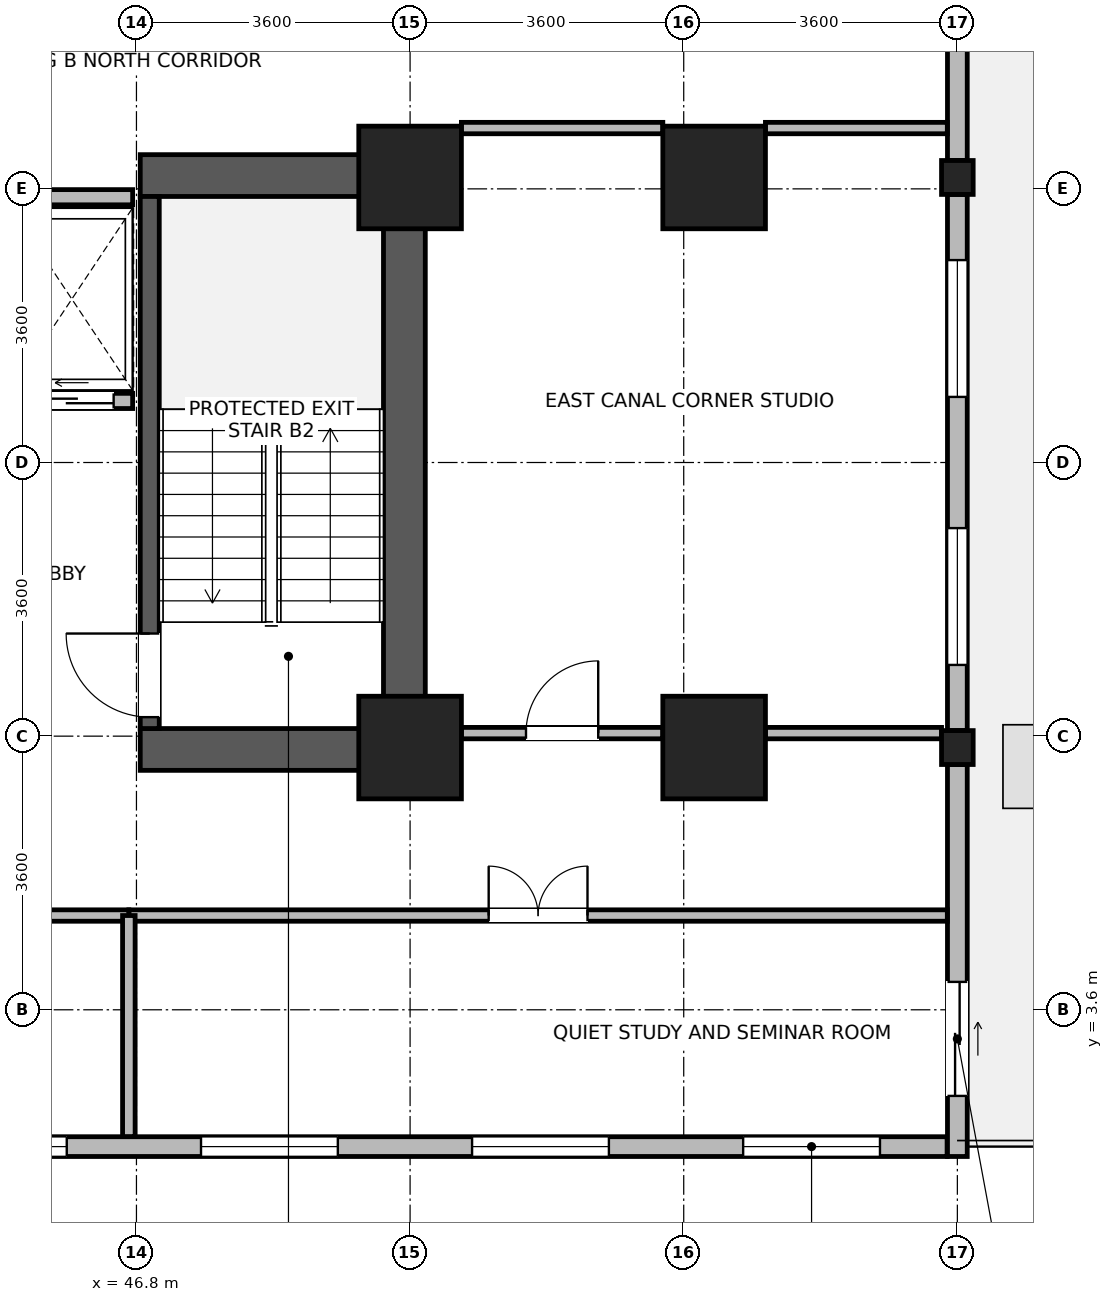
"""IFC4 building model, lengths in metres.
Left out: names, types, materials, properties, quantities, classifications, styles, units other than length and angle.
Written with IfcOpenShell. Run it as: python <this file> out.ifc"""

import sys

from ifc_helpers import new_model, si_unit, direction, frame, frame_2d, origin, origin_2d, place, context, subcontext, project, spatial, rectangle, i_section, extrude, source, transform, mapped, element, fill, save


model = new_model("IFC4")
c1 = context("Model", 3, precision=1e-05, world=origin(), true_north=direction((0.0, 1.0)))
c2 = subcontext(c1, "Body", "Model", "MODEL_VIEW")
j1 = project(units=[si_unit("LENGTHUNIT", "METRE"), si_unit("PLANEANGLEUNIT", "RADIAN")], contexts=[c1])
p1 = place(None, origin())
s1 = spatial("IfcSite", under=j1, at=p1, CompositionType="ELEMENT")
p2 = place(p1, origin())
s2 = spatial("IfcBuilding", under=s1, at=p2, CompositionType="ELEMENT")
p3 = place(p2, frame((0.0, 0.0, 40.1)))
s3 = spatial("IfcBuildingStorey", under=s2, at=p3, CompositionType="ELEMENT", Elevation=40.1)
p4 = place(p3, frame((50.325, 6.75, 0.0), z_axis=(0.0, 0.0, 1.0), x_axis=(0.0, 1.0, 0.0)))
e1 = element("IfcWall", 1, at=p4, inside=s3, PredefinedType="SHEAR", context=c2, shape_type="SweptSolid", body=[
    extrude(rectangle(XDim=8.1, YDim=0.55, at=frame_2d((4.05, 0.0))), origin(), (0.0, 0.0, 1.0), 3.45),
])
for number, where, z_axis, x_axis in (
    (2, (46.85, 7.025, 0.0), (0.0, 0.0, 1.0), (1.0, 0.0, 0.0)),
    (3, (46.85, 14.575, 0.0), (0.0, 0.0, 1.0), (1.0, 0.0, 0.0)),
):
    element("IfcWall", number, at=place(p3, frame(where, z_axis=z_axis, x_axis=x_axis)), inside=s3, PredefinedType="SHEAR", context=c2, shape_type="SweptSolid", body=[
        extrude(rectangle(XDim=3.2, YDim=0.55, at=frame_2d((1.6, 0.0))), origin(), (0.0, 0.0, 1.0), 3.45),
    ])
p5 = place(p3, frame((46.975, 7.3, 0.0), z_axis=(0.0, 0.0, 1.0), x_axis=(0.0, 1.0, 0.0)))
e4 = element("IfcWall", 4, at=p5, inside=s3, PredefinedType="SHEAR", context=c2, shape_type="SweptSolid", body=[
    extrude(rectangle(XDim=7.0, YDim=0.25, at=frame_2d((3.5, 0.0))), origin(), (0.0, 0.0, 1.0), 3.45),
])
p6 = place(p5, frame((0.15, 0.0, 0.0)))
e5 = element("IfcOpeningElement", 5, at=p6, cuts=e4, PredefinedType="OPENING", context=c2, shape_type="SweptSolid", body=[
    extrude(rectangle(XDim=1.1, YDim=2.08, at=frame_2d((0.55, 1.04))), frame((0.0, 0.135, 0.0), z_axis=(0.0, -1.0, 0.0), x_axis=(1.0, 0.0, 0.0)), (0.0, 0.0, 1.0), 0.27),
])
m1 = source(origin(), c2, "Body", "SweptSolid", [
    extrude(rectangle(XDim=1.35, YDim=1.35, at=origin_2d()), origin(), (0.0, 0.0, 1.0), 3.7),
])
for number, where, z_axis, x_axis in (
    (6, (50.4, 7.05, 0.0), (0.0, 0.0, 1.0), (1.0, 0.0, 0.0)),
    (7, (50.4, 14.55, 0.0), (0.0, 0.0, 1.0), (1.0, 0.0, 0.0)),
    (8, (54.4, 7.05, 0.0), (0.0, 0.0, 1.0), (1.0, 0.0, 0.0)),
    (9, (54.4, 14.55, 0.0), (0.0, 0.0, 1.0), (1.0, 0.0, 0.0)),
):
    element("IfcColumn", number, at=place(p3, frame(where, z_axis=z_axis, x_axis=x_axis)), inside=s3, PredefinedType="COLUMN", context=c2, shape_type="MappedRepresentation", body=[
        mapped(m1, transform((0.0, 0.0, 0.0), x_axis=(1.0, 0.0, 0.0), y_axis=(0.0, 1.0, 0.0), z_axis=(0.0, 0.0, 1.0), scale=1.0)),
    ])
m2 = source(origin(), c2, "Body", "SweptSolid", [
    extrude(i_section(OverallWidth=0.416, OverallDepth=0.446, WebThickness=0.029, FlangeThickness=0.04, FilletRadius=0.015, at=origin_2d()), origin(), (0.0, 0.0, 1.0), 3.7),
])
for number, where, z_axis, x_axis in (
    (10, (57.6, 7.05, 0.0), (0.0, 0.0, 1.0), (1.0, 0.0, 0.0)),
    (11, (57.6, 14.55, 0.0), (0.0, 0.0, 1.0), (1.0, 0.0, 0.0)),
):
    element("IfcColumn", number, at=place(p3, frame(where, z_axis=z_axis, x_axis=x_axis)), inside=s3, PredefinedType="COLUMN", context=c2, shape_type="MappedRepresentation", body=[
        mapped(m2, transform((0.0, 0.0, 0.0), x_axis=(1.0, 0.0, 0.0), y_axis=(0.0, 1.0, 0.0), z_axis=(0.0, 0.0, 1.0), scale=1.0)),
    ])
p7 = place(p3, frame((57.465, 1.8, 0.0), z_axis=(0.0, 0.0, 1.0), x_axis=(-1.0, 0.0, 0.0)))
e12 = element("IfcWall", 12, at=p7, inside=s3, PredefinedType="STANDARD", context=c2, shape_type="SweptSolid", body=[
    extrude(rectangle(XDim=28.53, YDim=0.26, at=frame_2d((14.265, 0.0))), origin(), (0.0, 0.0, 1.0), 3.43),
])
p8 = place(p7, frame((0.883, 0.0, 0.85)))
e13 = element("IfcOpeningElement", 13, at=p8, cuts=e12, PredefinedType="OPENING", context=c2, shape_type="SweptSolid", body=[
    extrude(rectangle(XDim=1.8, YDim=1.85, at=frame_2d((0.9, 0.925))), frame((0.0, 0.14, 0.0), z_axis=(0.0, -1.0, 0.0), x_axis=(1.0, 0.0, 0.0)), (0.0, 0.0, 1.0), 0.28),
])
p9 = place(p7, frame((4.449, 0.0, 0.85)))
e14 = element("IfcOpeningElement", 14, at=p9, cuts=e12, PredefinedType="OPENING", context=c2, shape_type="SweptSolid", body=[
    extrude(rectangle(XDim=1.8, YDim=1.85, at=frame_2d((0.9, 0.925))), frame((0.0, 0.14, 0.0), z_axis=(0.0, -1.0, 0.0), x_axis=(1.0, 0.0, 0.0)), (0.0, 0.0, 1.0), 0.28),
])
p10 = place(p7, frame((8.016, 0.0, 0.85)))
e15 = element("IfcOpeningElement", 15, at=p10, cuts=e12, PredefinedType="OPENING", context=c2, shape_type="SweptSolid", body=[
    extrude(rectangle(XDim=1.8, YDim=1.85, at=frame_2d((0.9, 0.925))), frame((0.0, 0.14, 0.0), z_axis=(0.0, -1.0, 0.0), x_axis=(1.0, 0.0, 0.0)), (0.0, 0.0, 1.0), 0.28),
])
p11 = place(p7, frame((11.582, 0.0, 0.85)))
e16 = element("IfcOpeningElement", 16, at=p11, cuts=e12, PredefinedType="OPENING", context=c2, shape_type="SweptSolid", body=[
    extrude(rectangle(XDim=1.8, YDim=1.85, at=frame_2d((0.9, 0.925))), frame((0.0, 0.14, 0.0), z_axis=(0.0, -1.0, 0.0), x_axis=(1.0, 0.0, 0.0)), (0.0, 0.0, 1.0), 0.28),
])
p12 = place(p7, frame((15.148, 0.0, 0.85)))
e17 = element("IfcOpeningElement", 17, at=p12, cuts=e12, PredefinedType="OPENING", context=c2, shape_type="SweptSolid", body=[
    extrude(rectangle(XDim=1.8, YDim=1.85, at=frame_2d((0.9, 0.925))), frame((0.0, 0.14, 0.0), z_axis=(0.0, -1.0, 0.0), x_axis=(1.0, 0.0, 0.0)), (0.0, 0.0, 1.0), 0.28),
])
p13 = place(p7, frame((22.281, 0.0, 0.85)))
e18 = element("IfcOpeningElement", 18, at=p13, cuts=e12, PredefinedType="OPENING", context=c2, shape_type="SweptSolid", body=[
    extrude(rectangle(XDim=1.8, YDim=1.85, at=frame_2d((0.9, 0.925))), frame((0.0, 0.14, 0.0), z_axis=(0.0, -1.0, 0.0), x_axis=(1.0, 0.0, 0.0)), (0.0, 0.0, 1.0), 0.28),
])
p14 = place(p7, frame((25.847, 0.0, 0.85)))
e19 = element("IfcOpeningElement", 19, at=p14, cuts=e12, PredefinedType="OPENING", context=c2, shape_type="SweptSolid", body=[
    extrude(rectangle(XDim=1.8, YDim=1.85, at=frame_2d((0.9, 0.925))), frame((0.0, 0.14, 0.0), z_axis=(0.0, -1.0, 0.0), x_axis=(1.0, 0.0, 0.0)), (0.0, 0.0, 1.0), 0.28),
])
p15 = place(p3, frame((57.6, 6.826, 0.0), z_axis=(0.0, 0.0, 1.0), x_axis=(0.0, -1.0, 0.0)))
e20 = element("IfcWall", 20, at=p15, inside=s3, PredefinedType="STANDARD", context=c2, shape_type="SweptSolid", body=[
    extrude(rectangle(XDim=5.156, YDim=0.26, at=frame_2d((2.578, 0.0))), origin(), (0.0, 0.0, 1.0), 3.43),
])
p16 = place(p15, frame((2.859, 0.0, 0.0)))
e21 = element("IfcOpeningElement", 21, at=p16, cuts=e20, PredefinedType="OPENING", context=c2, shape_type="SweptSolid", body=[
    extrude(rectangle(XDim=1.5, YDim=2.15, at=frame_2d((0.75, 1.075))), frame((0.0, 0.14, 0.0), z_axis=(0.0, -1.0, 0.0), x_axis=(1.0, 0.0, 0.0)), (0.0, 0.0, 1.0), 0.28),
])
p17 = place(p3, frame((57.6, 14.326, 0.0), z_axis=(0.0, 0.0, 1.0), x_axis=(0.0, -1.0, 0.0)))
e22 = element("IfcWall", 22, at=p17, inside=s3, PredefinedType="STANDARD", context=c2, shape_type="SweptSolid", body=[
    extrude(rectangle(XDim=7.052, YDim=0.26, at=frame_2d((3.526, 0.0))), origin(), (0.0, 0.0, 1.0), 2.93),
])
p18 = place(p17, frame((0.863, 0.0, 0.85)))
e23 = element("IfcOpeningElement", 23, at=p18, cuts=e22, PredefinedType="OPENING", context=c2, shape_type="SweptSolid", body=[
    extrude(rectangle(XDim=1.8, YDim=1.85, at=frame_2d((0.9, 0.925))), frame((0.0, 0.14, 0.0), z_axis=(0.0, -1.0, 0.0), x_axis=(1.0, 0.0, 0.0)), (0.0, 0.0, 1.0), 0.28),
])
p19 = place(p17, frame((4.389, 0.0, 0.85)))
e24 = element("IfcOpeningElement", 24, at=p19, cuts=e22, PredefinedType="OPENING", context=c2, shape_type="SweptSolid", body=[
    extrude(rectangle(XDim=1.8, YDim=1.85, at=frame_2d((0.9, 0.925))), frame((0.0, 0.14, 0.0), z_axis=(0.0, -1.0, 0.0), x_axis=(1.0, 0.0, 0.0)), (0.0, 0.0, 1.0), 0.28),
])
p20 = place(p3, frame((57.6, 21.376, 0.0), z_axis=(0.0, 0.0, 1.0), x_axis=(0.0, -1.0, 0.0)))
e25 = element("IfcWall", 25, at=p20, inside=s3, PredefinedType="STANDARD", context=c2, shape_type="SweptSolid", body=[
    extrude(rectangle(XDim=6.602, YDim=0.26, at=frame_2d((3.301, 0.0))), origin(), (0.0, 0.0, 1.0), 2.93),
])
p21 = place(p20, frame((0.75, 0.0, 0.85)))
e26 = element("IfcOpeningElement", 26, at=p21, cuts=e25, PredefinedType="OPENING", context=c2, shape_type="SweptSolid", body=[
    extrude(rectangle(XDim=1.8, YDim=1.85, at=frame_2d((0.9, 0.925))), frame((0.0, 0.14, 0.0), z_axis=(0.0, -1.0, 0.0), x_axis=(1.0, 0.0, 0.0)), (0.0, 0.0, 1.0), 0.28),
])
p22 = place(p3, frame((45.15, 11.61, 0.0), z_axis=(0.0, 0.0, 1.0), x_axis=(1.0, 0.0, 0.0)))
e27 = element("IfcWall", 27, at=p22, inside=s3, PredefinedType="PARTITIONING", context=c2, shape_type="SweptSolid", body=[
    extrude(rectangle(XDim=1.6, YDim=0.2, at=frame_2d((0.8, 0.0))), origin(), (0.0, 0.0, 1.0), 3.43),
])
p23 = place(p22, frame((0.25, 0.0, 0.0)))
e28 = element("IfcOpeningElement", 28, at=p23, cuts=e27, PredefinedType="OPENING", context=c2, shape_type="SweptSolid", body=[
    extrude(rectangle(XDim=1.1, YDim=2.12, at=frame_2d((0.55, 1.06))), frame((0.0, 0.11, 0.0), z_axis=(0.0, -1.0, 0.0), x_axis=(1.0, 0.0, 0.0)), (0.0, 0.0, 1.0), 0.22),
])
p24 = place(p3, frame((45.15, 14.29, 0.0), z_axis=(0.0, 0.0, 1.0), x_axis=(1.0, 0.0, 0.0)))
e29 = element("IfcWall", 29, at=p24, inside=s3, PredefinedType="PARTITIONING", context=c2, shape_type="SweptSolid", body=[
    extrude(rectangle(XDim=1.6, YDim=0.2, at=frame_2d((0.8, 0.0))), origin(), (0.0, 0.0, 1.0), 2.23),
])
p25 = place(p3, frame((46.7, 4.84, 0.0), z_axis=(0.0, 0.0, 1.0), x_axis=(1.0, 0.0, 0.0)))
e30 = element("IfcWall", 30, at=p25, inside=s3, PredefinedType="PARTITIONING", context=c2, shape_type="SweptSolid", body=[
    extrude(rectangle(XDim=10.768, YDim=0.15, at=frame_2d((5.384, 0.0))), origin(), (0.0, 0.0, 1.0), 3.43),
])
p26 = place(p25, frame((4.734, 0.0, 0.0)))
e31 = element("IfcOpeningElement", 31, at=p26, cuts=e30, PredefinedType="OPENING", context=c2, shape_type="SweptSolid", body=[
    extrude(rectangle(XDim=1.3, YDim=2.12, at=frame_2d((0.65, 1.06))), frame((0.0, 0.085, 0.0), z_axis=(0.0, -1.0, 0.0), x_axis=(1.0, 0.0, 0.0)), (0.0, 0.0, 1.0), 0.17),
])
p27 = place(p3, frame((37.5, 4.84, 0.0), z_axis=(0.0, 0.0, 1.0), x_axis=(1.0, 0.0, 0.0)))
e32 = element("IfcWall", 32, at=p27, inside=s3, PredefinedType="PARTITIONING", context=c2, shape_type="SweptSolid", body=[
    extrude(rectangle(XDim=9.2, YDim=0.15, at=frame_2d((4.6, 0.0))), origin(), (0.0, 0.0, 1.0), 3.43),
])
p28 = place(p27, frame((4.125, 0.0, 0.0)))
e33 = element("IfcOpeningElement", 33, at=p28, cuts=e32, PredefinedType="OPENING", context=c2, shape_type="SweptSolid", body=[
    extrude(rectangle(XDim=0.95, YDim=2.1, at=frame_2d((0.475, 1.05))), frame((0.0, 0.085, 0.0), z_axis=(0.0, -1.0, 0.0), x_axis=(1.0, 0.0, 0.0)), (0.0, 0.0, 1.0), 0.17),
])
p29 = place(p3, frame((51.075, 7.24, 0.0), z_axis=(0.0, 0.0, 1.0), x_axis=(1.0, 0.0, 0.0)))
e34 = element("IfcWall", 34, at=p29, inside=s3, PredefinedType="PARTITIONING", context=c2, shape_type="SweptSolid", body=[
    extrude(rectangle(XDim=2.65, YDim=0.15, at=frame_2d((1.325, 0.0))), origin(), (0.0, 0.0, 1.0), 2.78),
])
p30 = place(p29, frame((0.85, 0.0, 0.0)))
e35 = element("IfcOpeningElement", 35, at=p30, cuts=e34, PredefinedType="OPENING", context=c2, shape_type="SweptSolid", body=[
    extrude(rectangle(XDim=0.95, YDim=2.1, at=frame_2d((0.475, 1.05))), frame((0.0, 0.085, 0.0), z_axis=(0.0, -1.0, 0.0), x_axis=(1.0, 0.0, 0.0)), (0.0, 0.0, 1.0), 0.17),
])
p31 = place(p3, frame((55.075, 7.24, 0.0), z_axis=(0.0, 0.0, 1.0), x_axis=(1.0, 0.0, 0.0)))
e36 = element("IfcWall", 36, at=p31, inside=s3, PredefinedType="PARTITIONING", context=c2, shape_type="SweptSolid", body=[
    extrude(rectangle(XDim=2.317, YDim=0.15, at=frame_2d((1.159, 0.0))), origin(), (0.0, 0.0, 1.0), 2.78),
])
p32 = place(p3, frame((51.075, 15.2, 0.0), z_axis=(0.0, 0.0, 1.0), x_axis=(1.0, 0.0, 0.0)))
e37 = element("IfcWall", 37, at=p32, inside=s3, PredefinedType="PARTITIONING", context=c2, shape_type="SweptSolid", body=[
    extrude(rectangle(XDim=2.65, YDim=0.15, at=frame_2d((1.325, 0.0))), origin(), (0.0, 0.0, 1.0), 3.43),
])
p33 = place(p3, frame((55.075, 15.2, 0.0), z_axis=(0.0, 0.0, 1.0), x_axis=(1.0, 0.0, 0.0)))
e38 = element("IfcWall", 38, at=p33, inside=s3, PredefinedType="PARTITIONING", context=c2, shape_type="SweptSolid", body=[
    extrude(rectangle(XDim=2.393, YDim=0.15, at=frame_2d((1.197, 0.0))), origin(), (0.0, 0.0, 1.0), 3.43),
])
p34 = place(p3, frame((46.7, 1.932, 0.0), z_axis=(0.0, 0.0, 1.0), x_axis=(0.0, 1.0, 0.0)))
e39 = element("IfcWall", 39, at=p34, inside=s3, PredefinedType="PARTITIONING", context=c2, shape_type="SweptSolid", body=[
    extrude(rectangle(XDim=2.908, YDim=0.165, at=frame_2d((1.454, 0.0))), origin(), (0.0, 0.0, 1.0), 3.43),
])
p35 = place(p8, origin())
e40 = element("IfcWindow", 40, at=p35, inside=s3, PartitioningType="SINGLE_PANEL", PredefinedType="WINDOW", context=c2, shape_type="SweptSolid", body=[
    extrude(rectangle(XDim=1.8, YDim=1.85, at=frame_2d((0.9, 0.925))), frame((0.0, 0.03, 0.0), z_axis=(0.0, -1.0, 0.0), x_axis=(1.0, 0.0, 0.0)), (0.0, 0.0, 1.0), 0.06),
])
fill(e13, e40)
p36 = place(p9, origin())
e41 = element("IfcWindow", 41, at=p36, inside=s3, PartitioningType="SINGLE_PANEL", PredefinedType="WINDOW", context=c2, shape_type="SweptSolid", body=[
    extrude(rectangle(XDim=1.8, YDim=1.85, at=frame_2d((0.9, 0.925))), frame((0.0, 0.03, 0.0), z_axis=(0.0, -1.0, 0.0), x_axis=(1.0, 0.0, 0.0)), (0.0, 0.0, 1.0), 0.06),
])
fill(e14, e41)
p37 = place(p10, origin())
e42 = element("IfcWindow", 42, at=p37, inside=s3, PartitioningType="SINGLE_PANEL", PredefinedType="WINDOW", context=c2, shape_type="SweptSolid", body=[
    extrude(rectangle(XDim=1.8, YDim=1.85, at=frame_2d((0.9, 0.925))), frame((0.0, 0.03, 0.0), z_axis=(0.0, -1.0, 0.0), x_axis=(1.0, 0.0, 0.0)), (0.0, 0.0, 1.0), 0.06),
])
fill(e15, e42)
p38 = place(p11, origin())
e43 = element("IfcWindow", 43, at=p38, inside=s3, PartitioningType="SINGLE_PANEL", PredefinedType="WINDOW", context=c2, shape_type="SweptSolid", body=[
    extrude(rectangle(XDim=1.8, YDim=1.85, at=frame_2d((0.9, 0.925))), frame((0.0, 0.03, 0.0), z_axis=(0.0, -1.0, 0.0), x_axis=(1.0, 0.0, 0.0)), (0.0, 0.0, 1.0), 0.06),
])
fill(e16, e43)
p39 = place(p16, origin())
e44 = element("IfcDoor", 44, at=p39, inside=s3, OperationType="SLIDING_TO_LEFT", PredefinedType="DOOR", context=c2, shape_type="SweptSolid", body=[
    extrude(rectangle(XDim=1.5, YDim=2.15, at=frame_2d((0.75, 1.075))), frame((0.0, 0.025, 0.0), z_axis=(0.0, -1.0, 0.0), x_axis=(1.0, 0.0, 0.0)), (0.0, 0.0, 1.0), 0.05),
])
fill(e21, e44)
p40 = place(p18, origin())
e45 = element("IfcWindow", 45, at=p40, inside=s3, PartitioningType="SINGLE_PANEL", PredefinedType="WINDOW", context=c2, shape_type="SweptSolid", body=[
    extrude(rectangle(XDim=1.8, YDim=1.85, at=frame_2d((0.9, 0.925))), frame((0.0, 0.03, 0.0), z_axis=(0.0, -1.0, 0.0), x_axis=(1.0, 0.0, 0.0)), (0.0, 0.0, 1.0), 0.06),
])
fill(e23, e45)
p41 = place(p19, origin())
e46 = element("IfcWindow", 46, at=p41, inside=s3, PartitioningType="SINGLE_PANEL", PredefinedType="WINDOW", context=c2, shape_type="SweptSolid", body=[
    extrude(rectangle(XDim=1.8, YDim=1.85, at=frame_2d((0.9, 0.925))), frame((0.0, 0.03, 0.0), z_axis=(0.0, -1.0, 0.0), x_axis=(1.0, 0.0, 0.0)), (0.0, 0.0, 1.0), 0.06),
])
fill(e24, e46)
p42 = place(p6, origin())
e47 = element("IfcDoor", 47, at=p42, inside=s3, OperationType="SINGLE_SWING_RIGHT", PredefinedType="DOOR", context=c2, shape_type="SweptSolid", body=[
    extrude(rectangle(XDim=1.1, YDim=2.08, at=frame_2d((0.55, 1.04))), frame((0.0, 0.025, 0.0), z_axis=(0.0, -1.0, 0.0), x_axis=(1.0, 0.0, 0.0)), (0.0, 0.0, 1.0), 0.05),
])
fill(e5, e47)
p43 = place(p23, origin())
e48 = element("IfcDoor", 48, at=p43, inside=s3, OperationType="SLIDING_TO_LEFT", PredefinedType="DOOR", context=c2, shape_type="SweptSolid", body=[
    extrude(rectangle(XDim=1.1, YDim=2.12, at=frame_2d((0.55, 1.06))), frame((0.0, 0.025, 0.0), z_axis=(0.0, -1.0, 0.0), x_axis=(1.0, 0.0, 0.0)), (0.0, 0.0, 1.0), 0.05),
])
fill(e28, e48)
p44 = place(p26, origin())
e49 = element("IfcDoor", 49, at=p44, inside=s3, OperationType="DOUBLE_DOOR_SINGLE_SWING", PredefinedType="DOOR", context=c2, shape_type="SweptSolid", body=[
    extrude(rectangle(XDim=1.3, YDim=2.12, at=frame_2d((0.65, 1.06))), frame((0.0, 0.025, 0.0), z_axis=(0.0, -1.0, 0.0), x_axis=(1.0, 0.0, 0.0)), (0.0, 0.0, 1.0), 0.05),
])
fill(e31, e49)
p45 = place(p30, origin())
e50 = element("IfcDoor", 50, at=p45, inside=s3, OperationType="SINGLE_SWING_RIGHT", PredefinedType="DOOR", context=c2, shape_type="SweptSolid", body=[
    extrude(rectangle(XDim=0.95, YDim=2.1, at=frame_2d((0.475, 1.05))), frame((0.0, 0.025, 0.0), z_axis=(0.0, -1.0, 0.0), x_axis=(1.0, 0.0, 0.0)), (0.0, 0.0, 1.0), 0.05),
])
fill(e35, e50)
save(model, sys.argv[1])
